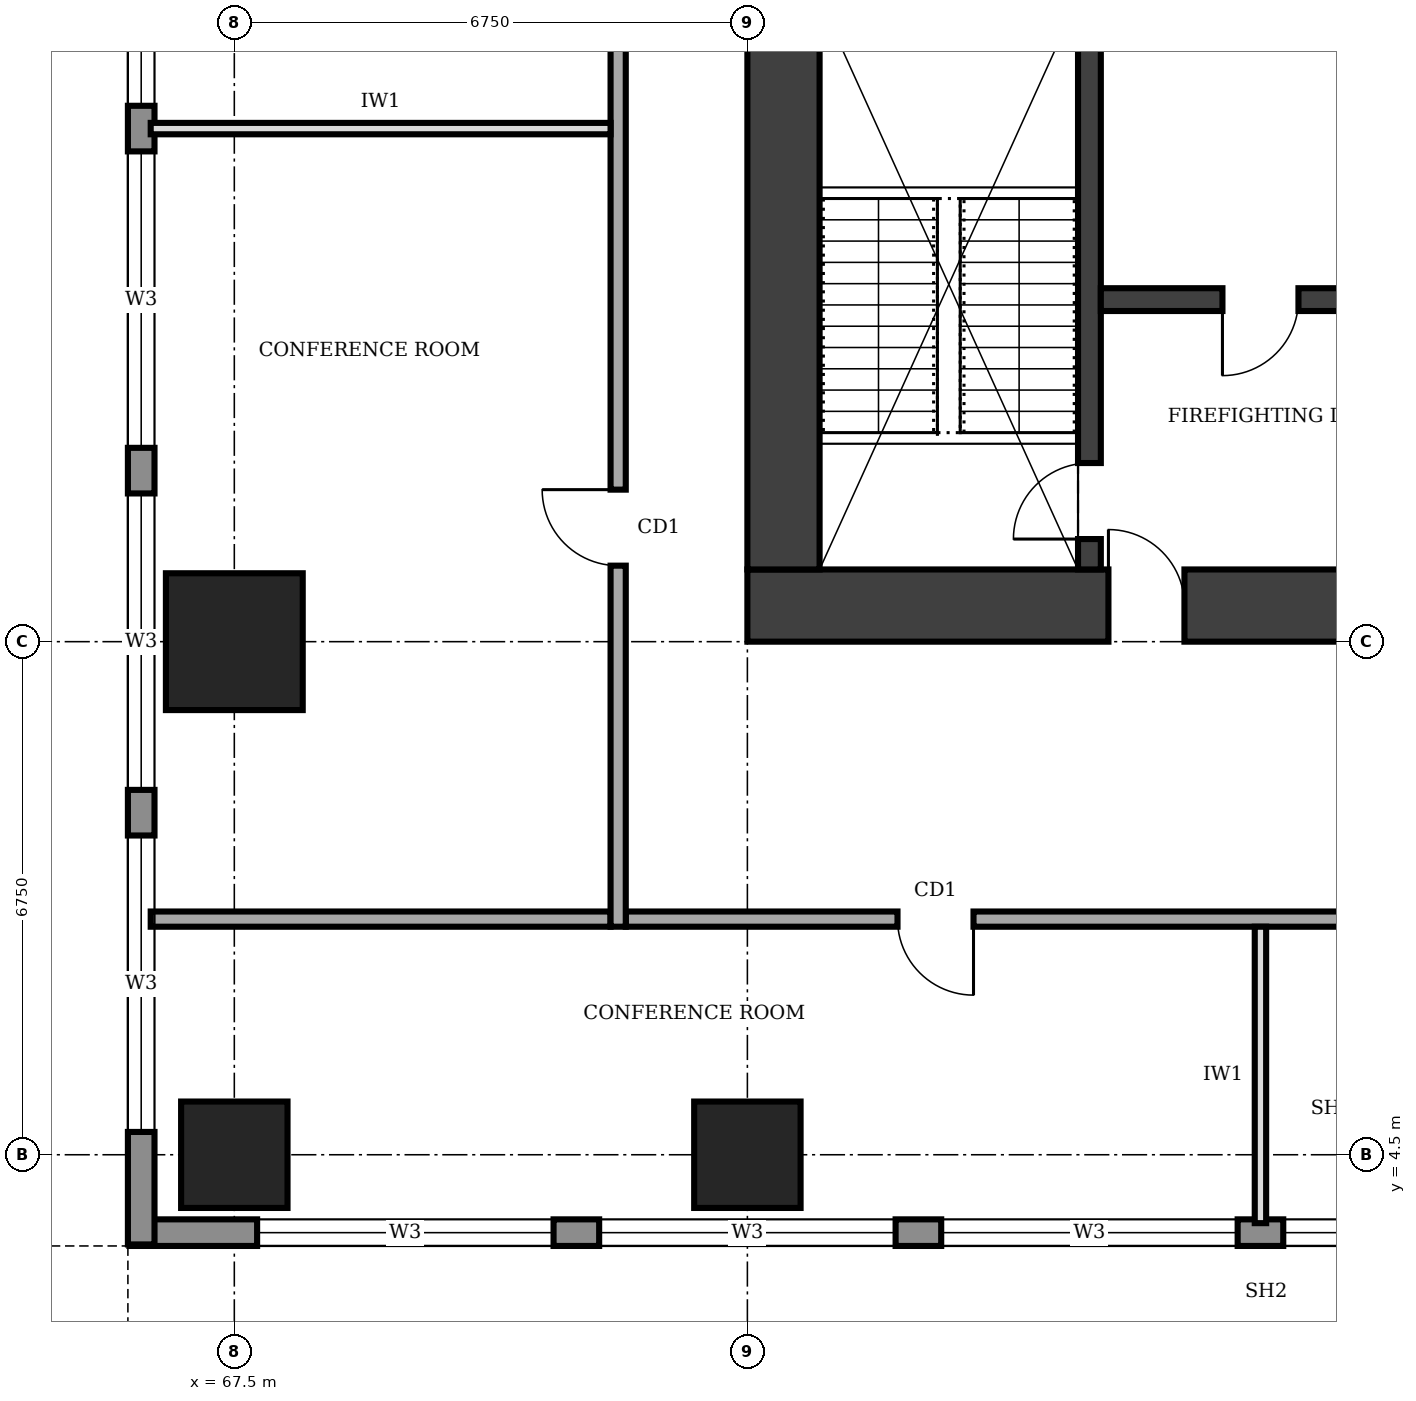
"""IFC4 building model, lengths in metres.
Left out: names, types, materials, properties, quantities, classifications, styles, units other than length and angle.
Written with IfcOpenShell. Run it as: python <this file> out.ifc"""

import sys

from ifc_helpers import new_model, si_unit, direction, frame, frame_2d, origin, origin_2d, place, context, subcontext, project, spatial, rectangle, extrude, element, fill, save


model = new_model("IFC4")
c1 = context("Model", 3, precision=1e-05, world=origin(), true_north=direction((0.0, 1.0)))
c2 = subcontext(c1, "Body", "Model", "MODEL_VIEW")
j1 = project(units=[si_unit("LENGTHUNIT", "METRE"), si_unit("PLANEANGLEUNIT", "RADIAN")], contexts=[c1])
p1 = place(None, origin())
s1 = spatial("IfcSite", under=j1, at=p1, CompositionType="ELEMENT")
p2 = place(p1, origin())
s2 = spatial("IfcBuilding", under=s1, at=p2, CompositionType="ELEMENT")
p3 = place(p2, frame((0.0, 0.0, 197.0)))
s3 = spatial("IfcBuildingStorey", under=s2, at=p3, CompositionType="ELEMENT", Elevation=197.0)
p4 = place(p3, frame((74.25, 11.725, 0.0), z_axis=(0.0, 0.0, 1.0), x_axis=(1.0, 0.0, 0.0)))
e1 = element("IfcWall", 1, at=p4, inside=s3, PredefinedType="SHEAR", context=c2, shape_type="SweptSolid", body=[
    extrude(rectangle(XDim=13.5, YDim=0.95, at=frame_2d((6.75, 0.0))), origin(), (0.0, 0.0, 1.0), 4.0),
])
p5 = place(p4, frame((4.75, 0.0, 0.0)))
e2 = element("IfcOpeningElement", 2, at=p5, cuts=e1, PredefinedType="OPENING", context=c2, shape_type="SweptSolid", body=[
    extrude(rectangle(XDim=1.0, YDim=2.1, at=frame_2d((0.5, 1.05))), frame((0.0, 0.485, 0.0), z_axis=(0.0, -1.0, 0.0), x_axis=(1.0, 0.0, 0.0)), (0.0, 0.0, 1.0), 0.97),
])
p6 = place(p3, frame((74.725, 28.3, 0.0), z_axis=(0.0, 0.0, 1.0), x_axis=(0.0, -1.0, 0.0)))
e3 = element("IfcWall", 3, at=p6, inside=s3, PredefinedType="SHEAR", context=c2, shape_type="SweptSolid", body=[
    extrude(rectangle(XDim=16.1, YDim=0.95, at=frame_2d((8.05, 0.0))), origin(), (0.0, 0.0, 1.0), 4.0),
])
p7 = place(p3, frame((78.75, 12.2, 0.0), z_axis=(0.0, 0.0, 1.0), x_axis=(0.0, 1.0, 0.0)))
e4 = element("IfcWall", 4, at=p7, inside=s3, PredefinedType="SHEAR", context=c2, shape_type="SweptSolid", body=[
    extrude(rectangle(XDim=16.1, YDim=0.3, at=frame_2d((8.05, 0.0))), origin(), (0.0, 0.0, 1.0), 4.0),
])
p8 = place(p7, frame((0.4, 0.0, 0.0)))
e5 = element("IfcOpeningElement", 5, at=p8, cuts=e4, PredefinedType="OPENING", context=c2, shape_type="SweptSolid", body=[
    extrude(rectangle(XDim=1.0, YDim=2.1, at=frame_2d((0.5, 1.05))), frame((0.0, 0.16, 0.0), z_axis=(0.0, -1.0, 0.0), x_axis=(1.0, 0.0, 0.0)), (0.0, 0.0, 1.0), 0.32),
])
p9 = place(p7, frame((14.6, 0.0, 0.0)))
e6 = element("IfcOpeningElement", 6, at=p9, cuts=e4, PredefinedType="OPENING", context=c2, shape_type="SweptSolid", body=[
    extrude(rectangle(XDim=1.1, YDim=2.1, at=frame_2d((0.55, 1.05))), frame((0.0, 0.16, 0.0), z_axis=(0.0, -1.0, 0.0), x_axis=(1.0, 0.0, 0.0)), (0.0, 0.0, 1.0), 0.32),
])
p10 = place(p7, frame((9.05, 0.0, 0.0)))
e7 = element("IfcOpeningElement", 7, at=p10, cuts=e4, PredefinedType="OPENING", context=c2, shape_type="SweptSolid", body=[
    extrude(rectangle(XDim=1.0, YDim=2.1, at=frame_2d((0.5, 1.05))), frame((0.0, 0.16, 0.0), z_axis=(0.0, -1.0, 0.0), x_axis=(1.0, 0.0, 0.0)), (0.0, 0.0, 1.0), 0.32),
])
p11 = place(p7, frame((12.05, 0.0, 0.0)))
e8 = element("IfcOpeningElement", 8, at=p11, cuts=e4, PredefinedType="OPENING", context=c2, shape_type="SweptSolid", body=[
    extrude(rectangle(XDim=1.0, YDim=2.1, at=frame_2d((0.5, 1.05))), frame((0.0, 0.16, 0.0), z_axis=(0.0, -1.0, 0.0), x_axis=(1.0, 0.0, 0.0)), (0.0, 0.0, 1.0), 0.32),
])
p12 = place(p3, frame((78.9, 15.75, 0.0), z_axis=(0.0, 0.0, 1.0), x_axis=(1.0, 0.0, 0.0)))
e9 = element("IfcWall", 9, at=p12, inside=s3, PredefinedType="SHEAR", context=c2, shape_type="SweptSolid", body=[
    extrude(rectangle(XDim=4.2, YDim=0.3, at=frame_2d((2.1, 0.0))), origin(), (0.0, 0.0, 1.0), 4.0),
])
p13 = place(p12, frame((1.6, 0.0, 0.0)))
e10 = element("IfcOpeningElement", 10, at=p13, cuts=e9, PredefinedType="OPENING", context=c2, shape_type="SweptSolid", body=[
    extrude(rectangle(XDim=1.0, YDim=2.1, at=frame_2d((0.5, 1.05))), frame((0.0, 0.16, 0.0), z_axis=(0.0, -1.0, 0.0), x_axis=(1.0, 0.0, 0.0)), (0.0, 0.0, 1.0), 0.32),
])
for number, where, z_axis, x_axis in (
    (11, (67.5, 4.5, 0.0), (0.0, 0.0, 1.0), (1.0, 0.0, 0.0)),
    (12, (74.25, 4.5, 0.0), (0.0, 0.0, 1.0), (1.0, 0.0, 0.0)),
):
    element("IfcColumn", number, at=place(p3, frame(where, z_axis=z_axis, x_axis=x_axis)), inside=s3, PredefinedType="COLUMN", context=c2, shape_type="SweptSolid", body=[
        extrude(rectangle(XDim=1.4, YDim=1.4, at=origin_2d()), origin(), (0.0, 0.0, 1.0), 4.0),
    ])
p14 = place(p3, frame((67.5, 11.25, 0.0), z_axis=(0.0, 0.0, 1.0), x_axis=(1.0, 0.0, 0.0)))
e13 = element("IfcColumn", 13, at=p14, inside=s3, PredefinedType="COLUMN", context=c2, shape_type="SweptSolid", body=[
    extrude(rectangle(XDim=1.8, YDim=1.8, at=origin_2d()), origin(), (0.0, 0.0, 1.0), 4.0),
])
p15 = place(p3, frame((66.12, 3.475, 0.0), z_axis=(0.0, 0.0, 1.0), x_axis=(1.0, 0.0, 0.0)))
e14 = element("IfcWall", 14, at=p15, inside=s3, PredefinedType="STANDARD", context=c2, shape_type="SweptSolid", body=[
    extrude(rectangle(XDim=29.91, YDim=0.35, at=frame_2d((14.955, 0.0))), origin(), (0.0, 0.0, 1.0), 3.75),
])
p16 = place(p15, frame((1.68, 0.0, 0.95)))
e15 = element("IfcOpeningElement", 15, at=p16, cuts=e14, PredefinedType="OPENING", context=c2, shape_type="SweptSolid", body=[
    extrude(rectangle(XDim=3.9, YDim=1.8, at=frame_2d((1.95, 0.9))), frame((0.0, 0.185, 0.0), z_axis=(0.0, -1.0, 0.0), x_axis=(1.0, 0.0, 0.0)), (0.0, 0.0, 1.0), 0.37),
])
p17 = place(p15, frame((6.18, 0.0, 0.95)))
e16 = element("IfcOpeningElement", 16, at=p17, cuts=e14, PredefinedType="OPENING", context=c2, shape_type="SweptSolid", body=[
    extrude(rectangle(XDim=3.9, YDim=1.8, at=frame_2d((1.95, 0.9))), frame((0.0, 0.185, 0.0), z_axis=(0.0, -1.0, 0.0), x_axis=(1.0, 0.0, 0.0)), (0.0, 0.0, 1.0), 0.37),
])
p18 = place(p15, frame((10.68, 0.0, 0.95)))
e17 = element("IfcOpeningElement", 17, at=p18, cuts=e14, PredefinedType="OPENING", context=c2, shape_type="SweptSolid", body=[
    extrude(rectangle(XDim=3.9, YDim=1.8, at=frame_2d((1.95, 0.9))), frame((0.0, 0.185, 0.0), z_axis=(0.0, -1.0, 0.0), x_axis=(1.0, 0.0, 0.0)), (0.0, 0.0, 1.0), 0.37),
])
p19 = place(p15, frame((15.18, 0.0, 0.95)))
e18 = element("IfcOpeningElement", 18, at=p19, cuts=e14, PredefinedType="OPENING", context=c2, shape_type="SweptSolid", body=[
    extrude(rectangle(XDim=3.9, YDim=1.8, at=frame_2d((1.95, 0.9))), frame((0.0, 0.185, 0.0), z_axis=(0.0, -1.0, 0.0), x_axis=(1.0, 0.0, 0.0)), (0.0, 0.0, 1.0), 0.37),
])
p20 = place(p15, frame((19.68, 0.0, 0.95)))
e19 = element("IfcOpeningElement", 19, at=p20, cuts=e14, PredefinedType="OPENING", context=c2, shape_type="SweptSolid", body=[
    extrude(rectangle(XDim=3.9, YDim=1.8, at=frame_2d((1.95, 0.9))), frame((0.0, 0.185, 0.0), z_axis=(0.0, -1.0, 0.0), x_axis=(1.0, 0.0, 0.0)), (0.0, 0.0, 1.0), 0.37),
])
p21 = place(p15, frame((24.18, 0.0, 0.95)))
e20 = element("IfcOpeningElement", 20, at=p21, cuts=e14, PredefinedType="OPENING", context=c2, shape_type="SweptSolid", body=[
    extrude(rectangle(XDim=3.9, YDim=1.8, at=frame_2d((1.95, 0.9))), frame((0.0, 0.185, 0.0), z_axis=(0.0, -1.0, 0.0), x_axis=(1.0, 0.0, 0.0)), (0.0, 0.0, 1.0), 0.37),
])
p22 = place(p3, frame((66.275, 37.18, 0.0), z_axis=(0.0, 0.0, 1.0), x_axis=(0.0, -1.0, 0.0)))
e21 = element("IfcWall", 21, at=p22, inside=s3, PredefinedType="STANDARD", context=c2, shape_type="SweptSolid", body=[
    extrude(rectangle(XDim=33.86, YDim=0.35, at=frame_2d((16.93, 0.0))), origin(), (0.0, 0.0, 1.0), 3.75),
])
p23 = place(p22, frame((28.48, 0.0, 0.95)))
e22 = element("IfcOpeningElement", 22, at=p23, cuts=e21, PredefinedType="OPENING", context=c2, shape_type="SweptSolid", body=[
    extrude(rectangle(XDim=3.9, YDim=1.8, at=frame_2d((1.95, 0.9))), frame((0.0, 0.185, 0.0), z_axis=(0.0, -1.0, 0.0), x_axis=(1.0, 0.0, 0.0)), (0.0, 0.0, 1.0), 0.37),
])
p24 = place(p22, frame((23.98, 0.0, 0.95)))
e23 = element("IfcOpeningElement", 23, at=p24, cuts=e21, PredefinedType="OPENING", context=c2, shape_type="SweptSolid", body=[
    extrude(rectangle(XDim=3.9, YDim=1.8, at=frame_2d((1.95, 0.9))), frame((0.0, 0.185, 0.0), z_axis=(0.0, -1.0, 0.0), x_axis=(1.0, 0.0, 0.0)), (0.0, 0.0, 1.0), 0.37),
])
p25 = place(p22, frame((19.48, 0.0, 0.95)))
e24 = element("IfcOpeningElement", 24, at=p25, cuts=e21, PredefinedType="OPENING", context=c2, shape_type="SweptSolid", body=[
    extrude(rectangle(XDim=3.9, YDim=1.8, at=frame_2d((1.95, 0.9))), frame((0.0, 0.185, 0.0), z_axis=(0.0, -1.0, 0.0), x_axis=(1.0, 0.0, 0.0)), (0.0, 0.0, 1.0), 0.37),
])
p26 = place(p22, frame((14.98, 0.0, 0.95)))
e25 = element("IfcOpeningElement", 25, at=p26, cuts=e21, PredefinedType="OPENING", context=c2, shape_type="SweptSolid", body=[
    extrude(rectangle(XDim=3.9, YDim=1.8, at=frame_2d((1.95, 0.9))), frame((0.0, 0.185, 0.0), z_axis=(0.0, -1.0, 0.0), x_axis=(1.0, 0.0, 0.0)), (0.0, 0.0, 1.0), 0.37),
])
p27 = place(p22, frame((10.48, 0.0, 0.95)))
e26 = element("IfcOpeningElement", 26, at=p27, cuts=e21, PredefinedType="OPENING", context=c2, shape_type="SweptSolid", body=[
    extrude(rectangle(XDim=3.9, YDim=1.8, at=frame_2d((1.95, 0.9))), frame((0.0, 0.185, 0.0), z_axis=(0.0, -1.0, 0.0), x_axis=(1.0, 0.0, 0.0)), (0.0, 0.0, 1.0), 0.37),
])
p28 = place(p22, frame((5.98, 0.0, 0.95)))
e27 = element("IfcOpeningElement", 27, at=p28, cuts=e21, PredefinedType="OPENING", context=c2, shape_type="SweptSolid", body=[
    extrude(rectangle(XDim=3.9, YDim=1.8, at=frame_2d((1.95, 0.9))), frame((0.0, 0.185, 0.0), z_axis=(0.0, -1.0, 0.0), x_axis=(1.0, 0.0, 0.0)), (0.0, 0.0, 1.0), 0.37),
])
p29 = place(p22, frame((1.48, 0.0, 0.95)))
e28 = element("IfcOpeningElement", 28, at=p29, cuts=e21, PredefinedType="OPENING", context=c2, shape_type="SweptSolid", body=[
    extrude(rectangle(XDim=3.9, YDim=1.8, at=frame_2d((1.95, 0.9))), frame((0.0, 0.185, 0.0), z_axis=(0.0, -1.0, 0.0), x_axis=(1.0, 0.0, 0.0)), (0.0, 0.0, 1.0), 0.37),
])
p30 = place(p3, frame((72.65, 7.6, 0.0), z_axis=(0.0, 0.0, 1.0), x_axis=(1.0, 0.0, 0.0)))
e29 = element("IfcWall", 29, at=p30, inside=s3, PredefinedType="SOLIDWALL", context=c2, shape_type="SweptSolid", body=[
    extrude(rectangle(XDim=16.9, YDim=0.2, at=frame_2d((8.45, 0.0))), origin(), (0.0, 0.0, 1.0), 3.75),
])
p31 = place(p30, frame((3.575, 0.0, 0.0)))
e30 = element("IfcOpeningElement", 30, at=p31, cuts=e29, PredefinedType="OPENING", context=c2, shape_type="SweptSolid", body=[
    extrude(rectangle(XDim=1.0, YDim=2.1, at=frame_2d((0.5, 1.05))), frame((0.0, 0.11, 0.0), z_axis=(0.0, -1.0, 0.0), x_axis=(1.0, 0.0, 0.0)), (0.0, 0.0, 1.0), 0.22),
])
p32 = place(p3, frame((72.55, 32.8, 0.0), z_axis=(0.0, 0.0, 1.0), x_axis=(0.0, -1.0, 0.0)))
e31 = element("IfcWall", 31, at=p32, inside=s3, PredefinedType="SOLIDWALL", context=c2, shape_type="SweptSolid", body=[
    extrude(rectangle(XDim=25.3, YDim=0.2, at=frame_2d((12.65, 0.0))), origin(), (0.0, 0.0, 1.0), 3.75),
])
p33 = place(p32, frame((19.55, 0.0, 0.0)))
e32 = element("IfcOpeningElement", 32, at=p33, cuts=e31, PredefinedType="OPENING", context=c2, shape_type="SweptSolid", body=[
    extrude(rectangle(XDim=1.0, YDim=2.1, at=frame_2d((0.5, 1.05))), frame((0.0, 0.11, 0.0), z_axis=(0.0, -1.0, 0.0), x_axis=(1.0, 0.0, 0.0)), (0.0, 0.0, 1.0), 0.22),
])
p34 = place(p32, frame((6.8, 0.0, 0.0)))
e33 = element("IfcOpeningElement", 33, at=p34, cuts=e31, PredefinedType="OPENING", context=c2, shape_type="SweptSolid", body=[
    extrude(rectangle(XDim=1.0, YDim=2.1, at=frame_2d((0.5, 1.05))), frame((0.0, 0.11, 0.0), z_axis=(0.0, -1.0, 0.0), x_axis=(1.0, 0.0, 0.0)), (0.0, 0.0, 1.0), 0.22),
])
p35 = place(p3, frame((66.4, 7.6, 0.0), z_axis=(0.0, 0.0, 1.0), x_axis=(1.0, 0.0, 0.0)))
e34 = element("IfcWall", 34, at=p35, inside=s3, PredefinedType="SOLIDWALL", context=c2, shape_type="SweptSolid", body=[
    extrude(rectangle(XDim=6.05, YDim=0.2, at=frame_2d((3.025, 0.0))), origin(), (0.0, 0.0, 1.0), 3.75),
])
p36 = place(p3, frame((81.0, 3.6, 0.0), z_axis=(0.0, 0.0, 1.0), x_axis=(0.0, 1.0, 0.0)))
e35 = element("IfcWall", 35, at=p36, inside=s3, PredefinedType="PARTITIONING", context=c2, shape_type="SweptSolid", body=[
    extrude(rectangle(XDim=3.9, YDim=0.15, at=frame_2d((1.95, 0.0))), origin(), (0.0, 0.0, 1.0), 3.75),
])
p37 = place(p3, frame((66.4, 18.0, 0.0), z_axis=(0.0, 0.0, 1.0), x_axis=(1.0, 0.0, 0.0)))
e36 = element("IfcWall", 36, at=p37, inside=s3, PredefinedType="PARTITIONING", context=c2, shape_type="SweptSolid", body=[
    extrude(rectangle(XDim=6.05, YDim=0.15, at=frame_2d((3.025, 0.0))), origin(), (0.0, 0.0, 1.0), 3.75),
])
p38 = place(p16, origin())
e37 = element("IfcWindow", 37, at=p38, inside=s3, PartitioningType="SINGLE_PANEL", PredefinedType="WINDOW", context=c2, shape_type="SweptSolid", body=[
    extrude(rectangle(XDim=3.9, YDim=1.8, at=frame_2d((1.95, 0.9))), frame((0.0, 0.03, 0.0), z_axis=(0.0, -1.0, 0.0), x_axis=(1.0, 0.0, 0.0)), (0.0, 0.0, 1.0), 0.06),
])
fill(e15, e37)
p39 = place(p17, origin())
e38 = element("IfcWindow", 38, at=p39, inside=s3, PartitioningType="SINGLE_PANEL", PredefinedType="WINDOW", context=c2, shape_type="SweptSolid", body=[
    extrude(rectangle(XDim=3.9, YDim=1.8, at=frame_2d((1.95, 0.9))), frame((0.0, 0.03, 0.0), z_axis=(0.0, -1.0, 0.0), x_axis=(1.0, 0.0, 0.0)), (0.0, 0.0, 1.0), 0.06),
])
fill(e16, e38)
p40 = place(p18, origin())
e39 = element("IfcWindow", 39, at=p40, inside=s3, PartitioningType="SINGLE_PANEL", PredefinedType="WINDOW", context=c2, shape_type="SweptSolid", body=[
    extrude(rectangle(XDim=3.9, YDim=1.8, at=frame_2d((1.95, 0.9))), frame((0.0, 0.03, 0.0), z_axis=(0.0, -1.0, 0.0), x_axis=(1.0, 0.0, 0.0)), (0.0, 0.0, 1.0), 0.06),
])
fill(e17, e39)
p41 = place(p19, origin())
e40 = element("IfcWindow", 40, at=p41, inside=s3, PartitioningType="SINGLE_PANEL", PredefinedType="WINDOW", context=c2, shape_type="SweptSolid", body=[
    extrude(rectangle(XDim=3.9, YDim=1.8, at=frame_2d((1.95, 0.9))), frame((0.0, 0.03, 0.0), z_axis=(0.0, -1.0, 0.0), x_axis=(1.0, 0.0, 0.0)), (0.0, 0.0, 1.0), 0.06),
])
fill(e18, e40)
p42 = place(p23, origin())
e41 = element("IfcWindow", 41, at=p42, inside=s3, PartitioningType="SINGLE_PANEL", PredefinedType="WINDOW", context=c2, shape_type="SweptSolid", body=[
    extrude(rectangle(XDim=3.9, YDim=1.8, at=frame_2d((1.95, 0.9))), frame((0.0, 0.03, 0.0), z_axis=(0.0, -1.0, 0.0), x_axis=(1.0, 0.0, 0.0)), (0.0, 0.0, 1.0), 0.06),
])
fill(e22, e41)
p43 = place(p24, origin())
e42 = element("IfcWindow", 42, at=p43, inside=s3, PartitioningType="SINGLE_PANEL", PredefinedType="WINDOW", context=c2, shape_type="SweptSolid", body=[
    extrude(rectangle(XDim=3.9, YDim=1.8, at=frame_2d((1.95, 0.9))), frame((0.0, 0.03, 0.0), z_axis=(0.0, -1.0, 0.0), x_axis=(1.0, 0.0, 0.0)), (0.0, 0.0, 1.0), 0.06),
])
fill(e23, e42)
p44 = place(p25, origin())
e43 = element("IfcWindow", 43, at=p44, inside=s3, PartitioningType="SINGLE_PANEL", PredefinedType="WINDOW", context=c2, shape_type="SweptSolid", body=[
    extrude(rectangle(XDim=3.9, YDim=1.8, at=frame_2d((1.95, 0.9))), frame((0.0, 0.03, 0.0), z_axis=(0.0, -1.0, 0.0), x_axis=(1.0, 0.0, 0.0)), (0.0, 0.0, 1.0), 0.06),
])
fill(e24, e43)
p45 = place(p26, origin())
e44 = element("IfcWindow", 44, at=p45, inside=s3, PartitioningType="SINGLE_PANEL", PredefinedType="WINDOW", context=c2, shape_type="SweptSolid", body=[
    extrude(rectangle(XDim=3.9, YDim=1.8, at=frame_2d((1.95, 0.9))), frame((0.0, 0.03, 0.0), z_axis=(0.0, -1.0, 0.0), x_axis=(1.0, 0.0, 0.0)), (0.0, 0.0, 1.0), 0.06),
])
fill(e25, e44)
p46 = place(p5, origin())
e45 = element("IfcDoor", 45, at=p46, inside=s3, OperationType="SINGLE_SWING_LEFT", PredefinedType="DOOR", context=c2, shape_type="SweptSolid", body=[
    extrude(rectangle(XDim=1.0, YDim=2.1, at=frame_2d((0.5, 1.05))), frame((0.0, 0.025, 0.0), z_axis=(0.0, -1.0, 0.0), x_axis=(1.0, 0.0, 0.0)), (0.0, 0.0, 1.0), 0.05),
])
fill(e2, e45)
p47 = place(p13, frame((1.0, 0.0, 0.0), z_axis=(0.0, 0.0, 1.0), x_axis=(-1.0, 0.0, 0.0)))
e46 = element("IfcDoor", 46, at=p47, inside=s3, OperationType="SINGLE_SWING_RIGHT", PredefinedType="DOOR", context=c2, shape_type="SweptSolid", body=[
    extrude(rectangle(XDim=1.0, YDim=2.1, at=frame_2d((0.5, 1.05))), frame((0.0, 0.025, 0.0), z_axis=(0.0, -1.0, 0.0), x_axis=(1.0, 0.0, 0.0)), (0.0, 0.0, 1.0), 0.05),
])
fill(e10, e46)
p48 = place(p8, origin())
e47 = element("IfcDoor", 47, at=p48, inside=s3, OperationType="SINGLE_SWING_LEFT", PredefinedType="DOOR", context=c2, shape_type="SweptSolid", body=[
    extrude(rectangle(XDim=1.0, YDim=2.1, at=frame_2d((0.5, 1.05))), frame((0.0, 0.025, 0.0), z_axis=(0.0, -1.0, 0.0), x_axis=(1.0, 0.0, 0.0)), (0.0, 0.0, 1.0), 0.05),
])
fill(e5, e47)
p49 = place(p31, frame((1.0, 0.0, 0.0), z_axis=(0.0, 0.0, 1.0), x_axis=(-1.0, 0.0, 0.0)))
e48 = element("IfcDoor", 48, at=p49, inside=s3, OperationType="SINGLE_SWING_LEFT", PredefinedType="DOOR", context=c2, shape_type="SweptSolid", body=[
    extrude(rectangle(XDim=1.0, YDim=2.1, at=frame_2d((0.5, 1.05))), frame((0.0, 0.025, 0.0), z_axis=(0.0, -1.0, 0.0), x_axis=(1.0, 0.0, 0.0)), (0.0, 0.0, 1.0), 0.05),
])
fill(e30, e48)
p50 = place(p33, frame((1.0, 0.0, 0.0), z_axis=(0.0, 0.0, 1.0), x_axis=(-1.0, 0.0, 0.0)))
e49 = element("IfcDoor", 49, at=p50, inside=s3, OperationType="SINGLE_SWING_RIGHT", PredefinedType="DOOR", context=c2, shape_type="SweptSolid", body=[
    extrude(rectangle(XDim=1.0, YDim=2.1, at=frame_2d((0.5, 1.05))), frame((0.0, 0.025, 0.0), z_axis=(0.0, -1.0, 0.0), x_axis=(1.0, 0.0, 0.0)), (0.0, 0.0, 1.0), 0.05),
])
fill(e32, e49)
save(model, sys.argv[1])
